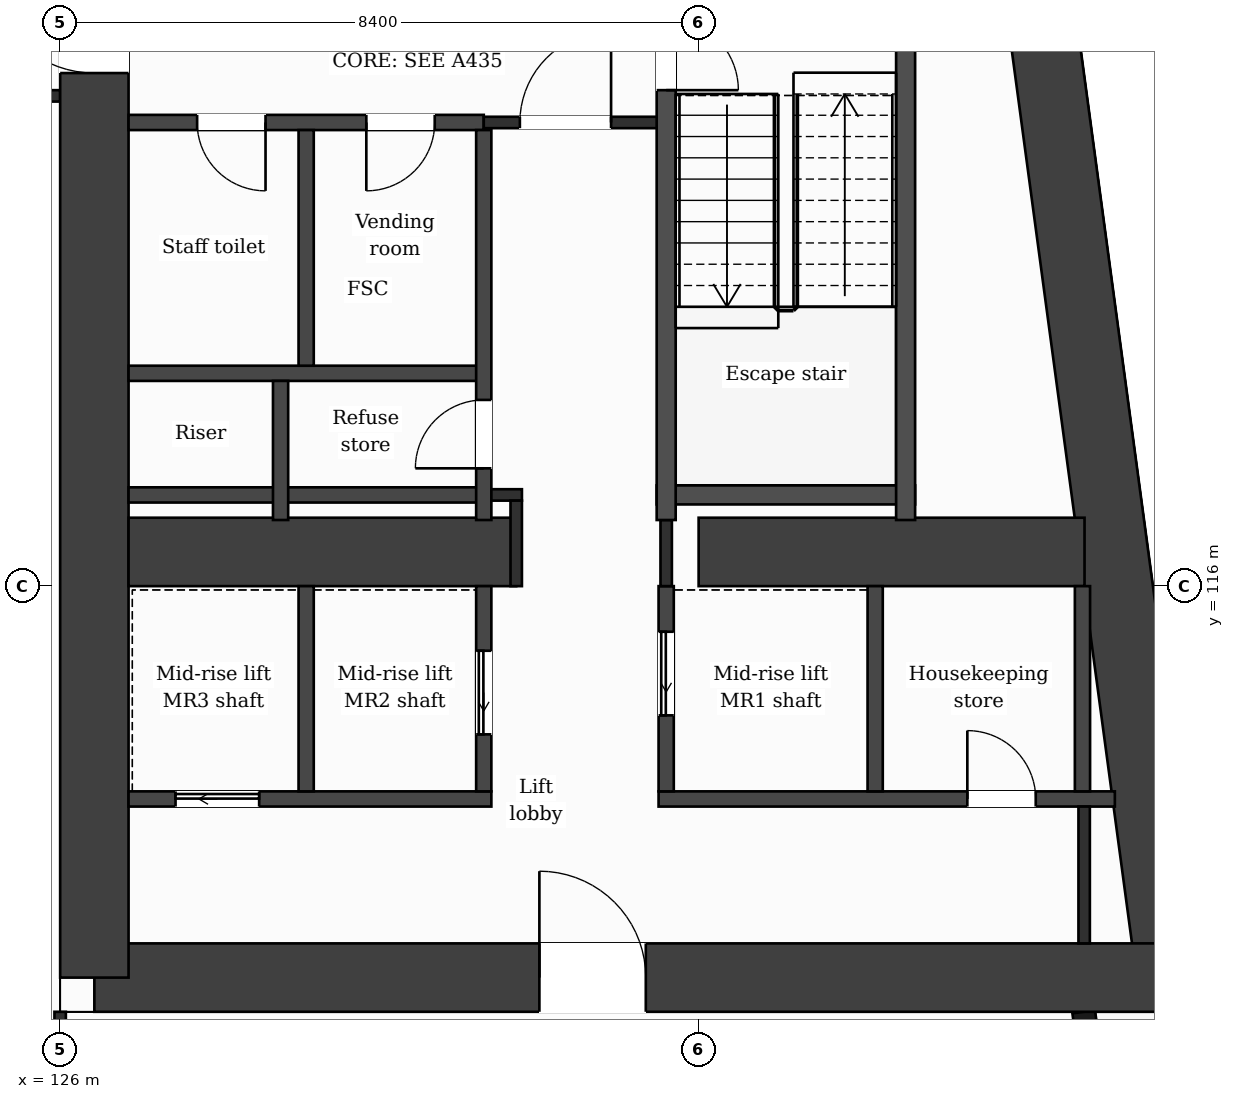
"""IFC4 building model, lengths in metres.
Left out: names, types, materials, properties, quantities, classifications, styles, units other than length and angle.
Written with IfcOpenShell. Run it as: python <this file> out.ifc"""

import sys

from ifc_helpers import new_model, si_unit, direction, frame, frame_2d, origin, place, context, subcontext, project, spatial, rectangle, extrude, element, fill, save


model = new_model("IFC4")
c1 = context("Model", 3, precision=1e-05, world=origin(), true_north=direction((0.0, 1.0)))
c2 = subcontext(c1, "Body", "Model", "MODEL_VIEW")
j1 = project(units=[si_unit("LENGTHUNIT", "METRE"), si_unit("PLANEANGLEUNIT", "RADIAN")], contexts=[c1])
p1 = place(None, origin())
s1 = spatial("IfcSite", under=j1, at=p1, CompositionType="ELEMENT")
p2 = place(p1, origin())
s2 = spatial("IfcBuilding", under=s1, at=p2, CompositionType="ELEMENT")
p3 = place(p2, frame((0.0, 0.0, 147.8)))
s3 = spatial("IfcBuildingStorey", under=s2, at=p3, CompositionType="ELEMENT", Elevation=147.8)
p4 = place(p3, frame((137.776, 131.95, 0.0), z_axis=(0.0, 0.0, 1.0), x_axis=(0.133421759112, -0.991059349482, 0.0)))
e1 = element("IfcWall", 1, at=p4, inside=s3, PredefinedType="SHEAR", context=c2, shape_type="SweptSolid", body=[
    extrude(rectangle(XDim=21.29, YDim=0.9, at=frame_2d((10.645, 0.0))), origin(), (0.0, 0.0, 1.0), 3.7),
])
p5 = place(p3, frame((140.616, 110.85, 0.0), z_axis=(0.0, 0.0, 1.0), x_axis=(-1.0, 0.0, 0.0)))
e2 = element("IfcWall", 2, at=p5, inside=s3, PredefinedType="SHEAR", context=c2, shape_type="SweptSolid", body=[
    extrude(rectangle(XDim=14.166, YDim=0.9, at=frame_2d((7.083, 0.0))), origin(), (0.0, 0.0, 1.0), 3.7),
])
p6 = place(p5, frame((6.911, 0.0, 0.0)))
e3 = element("IfcOpeningElement", 3, at=p6, cuts=e2, PredefinedType="OPENING", context=c2, shape_type="SweptSolid", body=[
    extrude(rectangle(XDim=1.4, YDim=2.1, at=frame_2d((0.7, 1.05))), frame((0.0, 0.46, 0.0), z_axis=(0.0, -1.0, 0.0), x_axis=(1.0, 0.0, 0.0)), (0.0, 0.0, 1.0), 0.92),
])
p7 = place(p3, frame((126.45, 110.85, 0.0), z_axis=(0.0, 0.0, 1.0), x_axis=(0.0, 1.0, 0.0)))
e4 = element("IfcWall", 4, at=p7, inside=s3, PredefinedType="SHEAR", context=c2, shape_type="SweptSolid", body=[
    extrude(rectangle(XDim=21.1, YDim=0.9, at=frame_2d((10.55, 0.0))), origin(), (0.0, 0.0, 1.0), 3.7),
])
p8 = place(p7, frame((11.9, 0.0, 0.0)))
e5 = element("IfcOpeningElement", 5, at=p8, cuts=e4, PredefinedType="OPENING", context=c2, shape_type="SweptSolid", body=[
    extrude(rectangle(XDim=1.4, YDim=2.1, at=frame_2d((0.7, 1.05))), frame((0.0, 0.46, 0.0), z_axis=(0.0, -1.0, 0.0), x_axis=(1.0, 0.0, 0.0)), (0.0, 0.0, 1.0), 0.92),
])
p9 = place(p3, frame((126.9, 116.45, 0.0), z_axis=(0.0, 0.0, 1.0), x_axis=(1.0, 0.0, 0.0)))
e6 = element("IfcWall", 6, at=p9, inside=s3, PredefinedType="SHEAR", context=c2, shape_type="SweptSolid", body=[
    extrude(rectangle(XDim=5.1, YDim=0.9, at=frame_2d((2.55, 0.0))), origin(), (0.0, 0.0, 1.0), 3.7),
])
p10 = place(p3, frame((134.4, 116.45, 0.0), z_axis=(0.0, 0.0, 1.0), x_axis=(1.0, 0.0, 0.0)))
e7 = element("IfcWall", 7, at=p10, inside=s3, PredefinedType="SHEAR", context=c2, shape_type="SweptSolid", body=[
    extrude(rectangle(XDim=5.077, YDim=0.9, at=frame_2d((2.539, 0.0))), origin(), (0.0, 0.0, 1.0), 3.7),
])
p11 = place(p3, frame((140.348, 103.85, 0.0), z_axis=(0.0, 0.0, 1.0), x_axis=(-0.133431549479, 0.991058031401, 0.0)))
e8 = element("IfcWall", 8, at=p11, inside=s3, PredefinedType="SOLIDWALL", context=c2, shape_type="SweptSolid", body=[
    extrude(rectangle(XDim=6.609, YDim=0.3, at=frame_2d((3.304, 0.0))), origin(), (0.0, 0.0, 1.0), 3.38),
])
p12 = place(p11, frame((0.737, 0.0, 0.9)))
e9 = element("IfcOpeningElement", 9, at=p12, cuts=e8, PredefinedType="OPENING", context=c2, shape_type="SweptSolid", body=[
    extrude(rectangle(XDim=1.2, YDim=2.1, at=frame_2d((0.6, 1.05))), frame((0.0, 0.16, 0.0), z_axis=(0.0, -1.0, 0.0), x_axis=(1.0, 0.0, 0.0)), (0.0, 0.0, 1.0), 0.32),
])
p13 = place(p11, frame((3.991, 0.0, 0.0)))
e10 = element("IfcOpeningElement", 10, at=p13, cuts=e8, PredefinedType="OPENING", context=c2, shape_type="SweptSolid", body=[
    extrude(rectangle(XDim=1.2, YDim=2.4, at=frame_2d((0.6, 1.2))), frame((0.0, 0.16, 0.0), z_axis=(0.0, -1.0, 0.0), x_axis=(1.0, 0.0, 0.0)), (0.0, 0.0, 1.0), 0.32),
])
p14 = place(p3, frame((126.9, 113.2, 0.0), z_axis=(0.0, 0.0, 1.0), x_axis=(1.0, 0.0, 0.0)))
e11 = element("IfcWall", 11, at=p14, inside=s3, PredefinedType="PARTITIONING", context=c2, shape_type="SweptSolid", body=[
    extrude(rectangle(XDim=4.773, YDim=0.2, at=frame_2d((2.387, 0.0))), origin(), (0.0, 0.0, 1.0), 3.38),
])
p15 = place(p14, frame((0.618, 0.0, 0.0)))
e12 = element("IfcOpeningElement", 12, at=p15, cuts=e11, PredefinedType="OPENING", context=c2, shape_type="SweptSolid", body=[
    extrude(rectangle(XDim=1.1, YDim=2.1, at=frame_2d((0.55, 1.05))), frame((0.0, 0.11, 0.0), z_axis=(0.0, -1.0, 0.0), x_axis=(1.0, 0.0, 0.0)), (0.0, 0.0, 1.0), 0.22),
])
p16 = place(p3, frame((133.873, 113.2, 0.0), z_axis=(0.0, 0.0, 1.0), x_axis=(1.0, 0.0, 0.0)))
e13 = element("IfcWall", 13, at=p16, inside=s3, PredefinedType="PARTITIONING", context=c2, shape_type="SweptSolid", body=[
    extrude(rectangle(XDim=6.003, YDim=0.2, at=frame_2d((3.001, 0.0))), origin(), (0.0, 0.0, 1.0), 3.38),
])
p17 = place(p16, frame((4.062, 0.0, 0.0)))
e14 = element("IfcOpeningElement", 14, at=p17, cuts=e13, PredefinedType="OPENING", context=c2, shape_type="SweptSolid", body=[
    extrude(rectangle(XDim=0.9, YDim=2.1, at=frame_2d((0.45, 1.05))), frame((0.0, 0.11, 0.0), z_axis=(0.0, -1.0, 0.0), x_axis=(1.0, 0.0, 0.0)), (0.0, 0.0, 1.0), 0.22),
])
p18 = place(p3, frame((126.9, 117.2, 0.0), z_axis=(0.0, 0.0, 1.0), x_axis=(1.0, 0.0, 0.0)))
e15 = element("IfcWall", 15, at=p18, inside=s3, PredefinedType="PARTITIONING", context=c2, shape_type="SweptSolid", body=[
    extrude(rectangle(XDim=4.673, YDim=0.2, at=frame_2d((2.336, 0.0))), origin(), (0.0, 0.0, 1.0), 3.38),
])
p19 = place(p3, frame((131.573, 117.2, 0.0), z_axis=(0.0, 0.0, 1.0), x_axis=(1.0, 0.0, 0.0)))
e16 = element("IfcWall", 16, at=p19, inside=s3, PredefinedType="PARTITIONING", context=c2, shape_type="SweptSolid", body=[
    extrude(rectangle(XDim=0.502, YDim=0.15, at=frame_2d((0.251, 0.0))), origin(), (0.0, 0.0, 1.0), 3.38),
])
p20 = place(p3, frame((133.848, 117.2, 0.0), z_axis=(0.0, 0.0, 1.0), x_axis=(1.0, 0.0, 0.0)))
e17 = element("IfcWall", 17, at=p20, inside=s3, PredefinedType="PARTITIONING", context=c2, shape_type="SweptSolid", body=[
    extrude(rectangle(XDim=3.4, YDim=0.25, at=frame_2d((1.7, 0.0))), origin(), (0.0, 0.0, 1.0), 3.38),
])
p21 = place(p3, frame((126.9, 118.8, 0.0), z_axis=(0.0, 0.0, 1.0), x_axis=(1.0, 0.0, 0.0)))
e18 = element("IfcWall", 18, at=p21, inside=s3, PredefinedType="PARTITIONING", context=c2, shape_type="SweptSolid", body=[
    extrude(rectangle(XDim=4.673, YDim=0.2, at=frame_2d((2.336, 0.0))), origin(), (0.0, 0.0, 1.0), 3.38),
])
p22 = place(p3, frame((126.9, 122.1, 0.0), z_axis=(0.0, 0.0, 1.0), x_axis=(1.0, 0.0, 0.0)))
e19 = element("IfcWall", 19, at=p22, inside=s3, PredefinedType="PARTITIONING", context=c2, shape_type="SweptSolid", body=[
    extrude(rectangle(XDim=4.673, YDim=0.2, at=frame_2d((2.336, 0.0))), origin(), (0.0, 0.0, 1.0), 3.38),
])
p23 = place(p22, frame((3.128, 0.0, 0.0)))
e20 = element("IfcOpeningElement", 20, at=p23, cuts=e19, PredefinedType="OPENING", context=c2, shape_type="SweptSolid", body=[
    extrude(rectangle(XDim=0.9, YDim=2.1, at=frame_2d((0.45, 1.05))), frame((0.0, 0.11, 0.0), z_axis=(0.0, -1.0, 0.0), x_axis=(1.0, 0.0, 0.0)), (0.0, 0.0, 1.0), 0.22),
])
p24 = place(p22, frame((0.902, 0.0, 0.0)))
e21 = element("IfcOpeningElement", 21, at=p24, cuts=e19, PredefinedType="OPENING", context=c2, shape_type="SweptSolid", body=[
    extrude(rectangle(XDim=0.9, YDim=2.1, at=frame_2d((0.45, 1.05))), frame((0.0, 0.11, 0.0), z_axis=(0.0, -1.0, 0.0), x_axis=(1.0, 0.0, 0.0)), (0.0, 0.0, 1.0), 0.22),
])
p25 = place(p3, frame((131.573, 122.1, 0.0), z_axis=(0.0, 0.0, 1.0), x_axis=(1.0, 0.0, 0.0)))
e22 = element("IfcWall", 22, at=p25, inside=s3, PredefinedType="PARTITIONING", context=c2, shape_type="SweptSolid", body=[
    extrude(rectangle(XDim=2.4, YDim=0.15, at=frame_2d((1.2, 0.0))), origin(), (0.0, 0.0, 1.0), 3.38),
])
p26 = place(p25, frame((0.475, 0.0, 0.0)))
e23 = element("IfcOpeningElement", 23, at=p26, cuts=e22, PredefinedType="OPENING", context=c2, shape_type="SweptSolid", body=[
    extrude(rectangle(XDim=1.2, YDim=2.1, at=frame_2d((0.6, 1.05))), frame((0.0, 0.085, 0.0), z_axis=(0.0, -1.0, 0.0), x_axis=(1.0, 0.0, 0.0)), (0.0, 0.0, 1.0), 0.17),
])
p27 = place(p3, frame((100.8, 122.45, 0.0), z_axis=(0.0, 0.0, 1.0), x_axis=(1.0, 0.0, 0.0)))
e24 = element("IfcWall", 24, at=p27, inside=s3, PredefinedType="PARTITIONING", context=c2, shape_type="SweptSolid", body=[
    extrude(rectangle(XDim=25.2, YDim=0.15, at=frame_2d((12.6, 0.0))), origin(), (0.0, 0.0, 1.0), 3.38),
])
p28 = place(p3, frame((126.0, 109.075, 0.0), z_axis=(0.0, 0.0, 1.0), x_axis=(0.0, 1.0, 0.0)))
e25 = element("IfcWall", 25, at=p28, inside=s3, PredefinedType="PARTITIONING", context=c2, shape_type="SweptSolid", body=[
    extrude(rectangle(XDim=1.325, YDim=0.15, at=frame_2d((0.663, 0.0))), origin(), (0.0, 0.0, 1.0), 3.38),
])
p29 = place(p3, frame((128.9, 116.87, 0.0), z_axis=(0.0, 0.0, 1.0), x_axis=(0.0, 1.0, 0.0)))
e26 = element("IfcWall", 26, at=p29, inside=s3, PredefinedType="PARTITIONING", context=c2, shape_type="SweptSolid", body=[
    extrude(rectangle(XDim=1.83, YDim=0.2, at=frame_2d((0.915, 0.0))), origin(), (0.0, 0.0, 1.0), 3.38),
])
p30 = place(p3, frame((129.237, 113.3, 0.0), z_axis=(0.0, 0.0, 1.0), x_axis=(0.0, 1.0, 0.0)))
e27 = element("IfcWall", 27, at=p30, inside=s3, PredefinedType="PARTITIONING", context=c2, shape_type="SweptSolid", body=[
    extrude(rectangle(XDim=2.7, YDim=0.2, at=frame_2d((1.35, 0.0))), origin(), (0.0, 0.0, 1.0), 3.38),
])
p31 = place(p3, frame((129.237, 118.9, 0.0), z_axis=(0.0, 0.0, 1.0), x_axis=(0.0, 1.0, 0.0)))
e28 = element("IfcWall", 28, at=p31, inside=s3, PredefinedType="PARTITIONING", context=c2, shape_type="SweptSolid", body=[
    extrude(rectangle(XDim=3.1, YDim=0.2, at=frame_2d((1.55, 0.0))), origin(), (0.0, 0.0, 1.0), 3.38),
])
p32 = place(p3, frame((131.573, 113.3, 0.0), z_axis=(0.0, 0.0, 1.0), x_axis=(0.0, 1.0, 0.0)))
e29 = element("IfcWall", 29, at=p32, inside=s3, PredefinedType="PARTITIONING", context=c2, shape_type="SweptSolid", body=[
    extrude(rectangle(XDim=2.7, YDim=0.2, at=frame_2d((1.35, 0.0))), origin(), (0.0, 0.0, 1.0), 3.38),
])
p33 = place(p32, frame((0.75, 0.0, 0.0)))
e30 = element("IfcOpeningElement", 30, at=p33, cuts=e29, PredefinedType="OPENING", context=c2, shape_type="SweptSolid", body=[
    extrude(rectangle(XDim=1.1, YDim=2.1, at=frame_2d((0.55, 1.05))), frame((0.0, 0.11, 0.0), z_axis=(0.0, -1.0, 0.0), x_axis=(1.0, 0.0, 0.0)), (0.0, 0.0, 1.0), 0.22),
])
p34 = place(p3, frame((131.573, 116.87, 0.0), z_axis=(0.0, 0.0, 1.0), x_axis=(0.0, 1.0, 0.0)))
e31 = element("IfcWall", 31, at=p34, inside=s3, PredefinedType="PARTITIONING", context=c2, shape_type="SweptSolid", body=[
    extrude(rectangle(XDim=5.13, YDim=0.2, at=frame_2d((2.565, 0.0))), origin(), (0.0, 0.0, 1.0), 3.38),
])
p35 = place(p34, frame((0.68, 0.0, 0.0)))
e32 = element("IfcOpeningElement", 32, at=p35, cuts=e31, PredefinedType="OPENING", context=c2, shape_type="SweptSolid", body=[
    extrude(rectangle(XDim=0.9, YDim=2.1, at=frame_2d((0.45, 1.05))), frame((0.0, 0.11, 0.0), z_axis=(0.0, -1.0, 0.0), x_axis=(1.0, 0.0, 0.0)), (0.0, 0.0, 1.0), 0.22),
])
p36 = place(p3, frame((132.0, 116.0, 0.0), z_axis=(0.0, 0.0, 1.0), x_axis=(0.0, 1.0, 0.0)))
e33 = element("IfcWall", 33, at=p36, inside=s3, PredefinedType="PARTITIONING", context=c2, shape_type="SweptSolid", body=[
    extrude(rectangle(XDim=1.125, YDim=0.15, at=frame_2d((0.562, 0.0))), origin(), (0.0, 0.0, 1.0), 3.38),
])
p37 = place(p3, frame((133.973, 113.3, 0.0), z_axis=(0.0, 0.0, 1.0), x_axis=(0.0, 1.0, 0.0)))
e34 = element("IfcWall", 34, at=p37, inside=s3, PredefinedType="PARTITIONING", context=c2, shape_type="SweptSolid", body=[
    extrude(rectangle(XDim=2.7, YDim=0.2, at=frame_2d((1.35, 0.0))), origin(), (0.0, 0.0, 1.0), 3.38),
])
p38 = place(p37, frame((1.0, 0.0, 0.0)))
e35 = element("IfcOpeningElement", 35, at=p38, cuts=e34, PredefinedType="OPENING", context=c2, shape_type="SweptSolid", body=[
    extrude(rectangle(XDim=1.1, YDim=2.1, at=frame_2d((0.55, 1.05))), frame((0.0, 0.11, 0.0), z_axis=(0.0, -1.0, 0.0), x_axis=(1.0, 0.0, 0.0)), (0.0, 0.0, 1.0), 0.22),
])
p39 = place(p3, frame((133.973, 116.0, 0.0), z_axis=(0.0, 0.0, 1.0), x_axis=(0.0, 1.0, 0.0)))
e36 = element("IfcWall", 36, at=p39, inside=s3, PredefinedType="PARTITIONING", context=c2, shape_type="SweptSolid", body=[
    extrude(rectangle(XDim=0.87, YDim=0.15, at=frame_2d((0.435, 0.0))), origin(), (0.0, 0.0, 1.0), 3.38),
])
p40 = place(p3, frame((133.973, 116.87, 0.0), z_axis=(0.0, 0.0, 1.0), x_axis=(0.0, 1.0, 0.0)))
e37 = element("IfcWall", 37, at=p40, inside=s3, PredefinedType="PARTITIONING", context=c2, shape_type="SweptSolid", body=[
    extrude(rectangle(XDim=6.955, YDim=0.25, at=frame_2d((3.478, 0.0))), origin(), (0.0, 0.0, 1.0), 3.38),
])
p41 = place(p40, frame((5.655, 0.0, 0.0)))
e38 = element("IfcOpeningElement", 38, at=p41, cuts=e37, PredefinedType="OPENING", context=c2, shape_type="SweptSolid", body=[
    extrude(rectangle(XDim=0.95, YDim=2.1, at=frame_2d((0.475, 1.05))), frame((0.0, 0.135, 0.0), z_axis=(0.0, -1.0, 0.0), x_axis=(1.0, 0.0, 0.0)), (0.0, 0.0, 1.0), 0.27),
])
p42 = place(p3, frame((136.722, 113.3, 0.0), z_axis=(0.0, 0.0, 1.0), x_axis=(0.0, 1.0, 0.0)))
e39 = element("IfcWall", 39, at=p42, inside=s3, PredefinedType="PARTITIONING", context=c2, shape_type="SweptSolid", body=[
    extrude(rectangle(XDim=2.7, YDim=0.2, at=frame_2d((1.35, 0.0))), origin(), (0.0, 0.0, 1.0), 3.38),
])
p43 = place(p3, frame((137.123, 116.87, 0.0), z_axis=(0.0, 0.0, 1.0), x_axis=(0.0, 1.0, 0.0)))
e40 = element("IfcWall", 40, at=p43, inside=s3, PredefinedType="PARTITIONING", context=c2, shape_type="SweptSolid", body=[
    extrude(rectangle(XDim=6.955, YDim=0.25, at=frame_2d((3.478, 0.0))), origin(), (0.0, 0.0, 1.0), 3.38),
])
p44 = place(p3, frame((139.45, 113.3, 0.0), z_axis=(0.0, 0.0, 1.0), x_axis=(0.0, 1.0, 0.0)))
e41 = element("IfcWall", 41, at=p44, inside=s3, PredefinedType="PARTITIONING", context=c2, shape_type="SweptSolid", body=[
    extrude(rectangle(XDim=2.7, YDim=0.2, at=frame_2d((1.35, 0.0))), origin(), (0.0, 0.0, 1.0), 3.38),
])
p45 = place(p3, frame((139.472, 111.3, 0.0), z_axis=(0.0, 0.0, 1.0), x_axis=(0.0, 1.0, 0.0)))
e42 = element("IfcWall", 42, at=p45, inside=s3, PredefinedType="PARTITIONING", context=c2, shape_type="SweptSolid", body=[
    extrude(rectangle(XDim=1.8, YDim=0.15, at=frame_2d((0.9, 0.0))), origin(), (0.0, 0.0, 1.0), 3.38),
])
p46 = place(p26, origin())
e43 = element("IfcDoor", 43, at=p46, inside=s3, OperationType="SINGLE_SWING_RIGHT", PredefinedType="DOOR", context=c2, shape_type="SweptSolid", body=[
    extrude(rectangle(XDim=1.2, YDim=2.1, at=frame_2d((0.6, 1.05))), frame((0.0, 0.025, 0.0), z_axis=(0.0, -1.0, 0.0), x_axis=(1.0, 0.0, 0.0)), (0.0, 0.0, 1.0), 0.05),
])
fill(e23, e43)
p47 = place(p23, origin())
e44 = element("IfcDoor", 44, at=p47, inside=s3, OperationType="SINGLE_SWING_LEFT", PredefinedType="DOOR", context=c2, shape_type="SweptSolid", body=[
    extrude(rectangle(XDim=0.9, YDim=2.1, at=frame_2d((0.45, 1.05))), frame((0.0, 0.025, 0.0), z_axis=(0.0, -1.0, 0.0), x_axis=(1.0, 0.0, 0.0)), (0.0, 0.0, 1.0), 0.05),
])
fill(e20, e44)
p48 = place(p24, origin())
e45 = element("IfcDoor", 45, at=p48, inside=s3, OperationType="SINGLE_SWING_RIGHT", PredefinedType="DOOR", context=c2, shape_type="SweptSolid", body=[
    extrude(rectangle(XDim=0.9, YDim=2.1, at=frame_2d((0.45, 1.05))), frame((0.0, 0.025, 0.0), z_axis=(0.0, -1.0, 0.0), x_axis=(1.0, 0.0, 0.0)), (0.0, 0.0, 1.0), 0.05),
])
fill(e21, e45)
p49 = place(p41, origin())
e46 = element("IfcDoor", 46, at=p49, inside=s3, OperationType="SINGLE_SWING_LEFT", PredefinedType="DOOR", context=c2, shape_type="SweptSolid", body=[
    extrude(rectangle(XDim=0.95, YDim=2.1, at=frame_2d((0.475, 1.05))), frame((0.0, 0.025, 0.0), z_axis=(0.0, -1.0, 0.0), x_axis=(1.0, 0.0, 0.0)), (0.0, 0.0, 1.0), 0.05),
])
fill(e38, e46)
p50 = place(p35, origin())
e47 = element("IfcDoor", 47, at=p50, inside=s3, OperationType="SINGLE_SWING_LEFT", PredefinedType="DOOR", context=c2, shape_type="SweptSolid", body=[
    extrude(rectangle(XDim=0.9, YDim=2.1, at=frame_2d((0.45, 1.05))), frame((0.0, 0.025, 0.0), z_axis=(0.0, -1.0, 0.0), x_axis=(1.0, 0.0, 0.0)), (0.0, 0.0, 1.0), 0.05),
])
fill(e32, e47)
p51 = place(p38, origin())
e48 = element("IfcDoor", 48, at=p51, inside=s3, OperationType="SLIDING_TO_LEFT", PredefinedType="DOOR", context=c2, shape_type="SweptSolid", body=[
    extrude(rectangle(XDim=1.1, YDim=2.1, at=frame_2d((0.55, 1.05))), frame((0.0, 0.025, 0.0), z_axis=(0.0, -1.0, 0.0), x_axis=(1.0, 0.0, 0.0)), (0.0, 0.0, 1.0), 0.05),
])
fill(e35, e48)
p52 = place(p33, origin())
e49 = element("IfcDoor", 49, at=p52, inside=s3, OperationType="SLIDING_TO_LEFT", PredefinedType="DOOR", context=c2, shape_type="SweptSolid", body=[
    extrude(rectangle(XDim=1.1, YDim=2.1, at=frame_2d((0.55, 1.05))), frame((0.0, 0.025, 0.0), z_axis=(0.0, -1.0, 0.0), x_axis=(1.0, 0.0, 0.0)), (0.0, 0.0, 1.0), 0.05),
])
fill(e30, e49)
p53 = place(p15, origin())
e50 = element("IfcDoor", 50, at=p53, inside=s3, OperationType="SLIDING_TO_LEFT", PredefinedType="DOOR", context=c2, shape_type="SweptSolid", body=[
    extrude(rectangle(XDim=1.1, YDim=2.1, at=frame_2d((0.55, 1.05))), frame((0.0, 0.025, 0.0), z_axis=(0.0, -1.0, 0.0), x_axis=(1.0, 0.0, 0.0)), (0.0, 0.0, 1.0), 0.05),
])
fill(e12, e50)
p54 = place(p17, origin())
e51 = element("IfcDoor", 51, at=p54, inside=s3, OperationType="SINGLE_SWING_LEFT", PredefinedType="DOOR", context=c2, shape_type="SweptSolid", body=[
    extrude(rectangle(XDim=0.9, YDim=2.1, at=frame_2d((0.45, 1.05))), frame((0.0, 0.025, 0.0), z_axis=(0.0, -1.0, 0.0), x_axis=(1.0, 0.0, 0.0)), (0.0, 0.0, 1.0), 0.05),
])
fill(e14, e51)
p55 = place(p6, origin())
e52 = element("IfcDoor", 52, at=p55, inside=s3, OperationType="SINGLE_SWING_RIGHT", PredefinedType="DOOR", context=c2, shape_type="SweptSolid", body=[
    extrude(rectangle(XDim=1.4, YDim=2.1, at=frame_2d((0.7, 1.05))), frame((0.0, 0.025, 0.0), z_axis=(0.0, -1.0, 0.0), x_axis=(1.0, 0.0, 0.0)), (0.0, 0.0, 1.0), 0.05),
])
fill(e3, e52)
p56 = place(p8, origin())
e53 = element("IfcDoor", 53, at=p56, inside=s3, OperationType="SINGLE_SWING_RIGHT", PredefinedType="DOOR", context=c2, shape_type="SweptSolid", body=[
    extrude(rectangle(XDim=1.4, YDim=2.1, at=frame_2d((0.7, 1.05))), frame((0.0, 0.025, 0.0), z_axis=(0.0, -1.0, 0.0), x_axis=(1.0, 0.0, 0.0)), (0.0, 0.0, 1.0), 0.05),
])
fill(e5, e53)
save(model, sys.argv[1])
